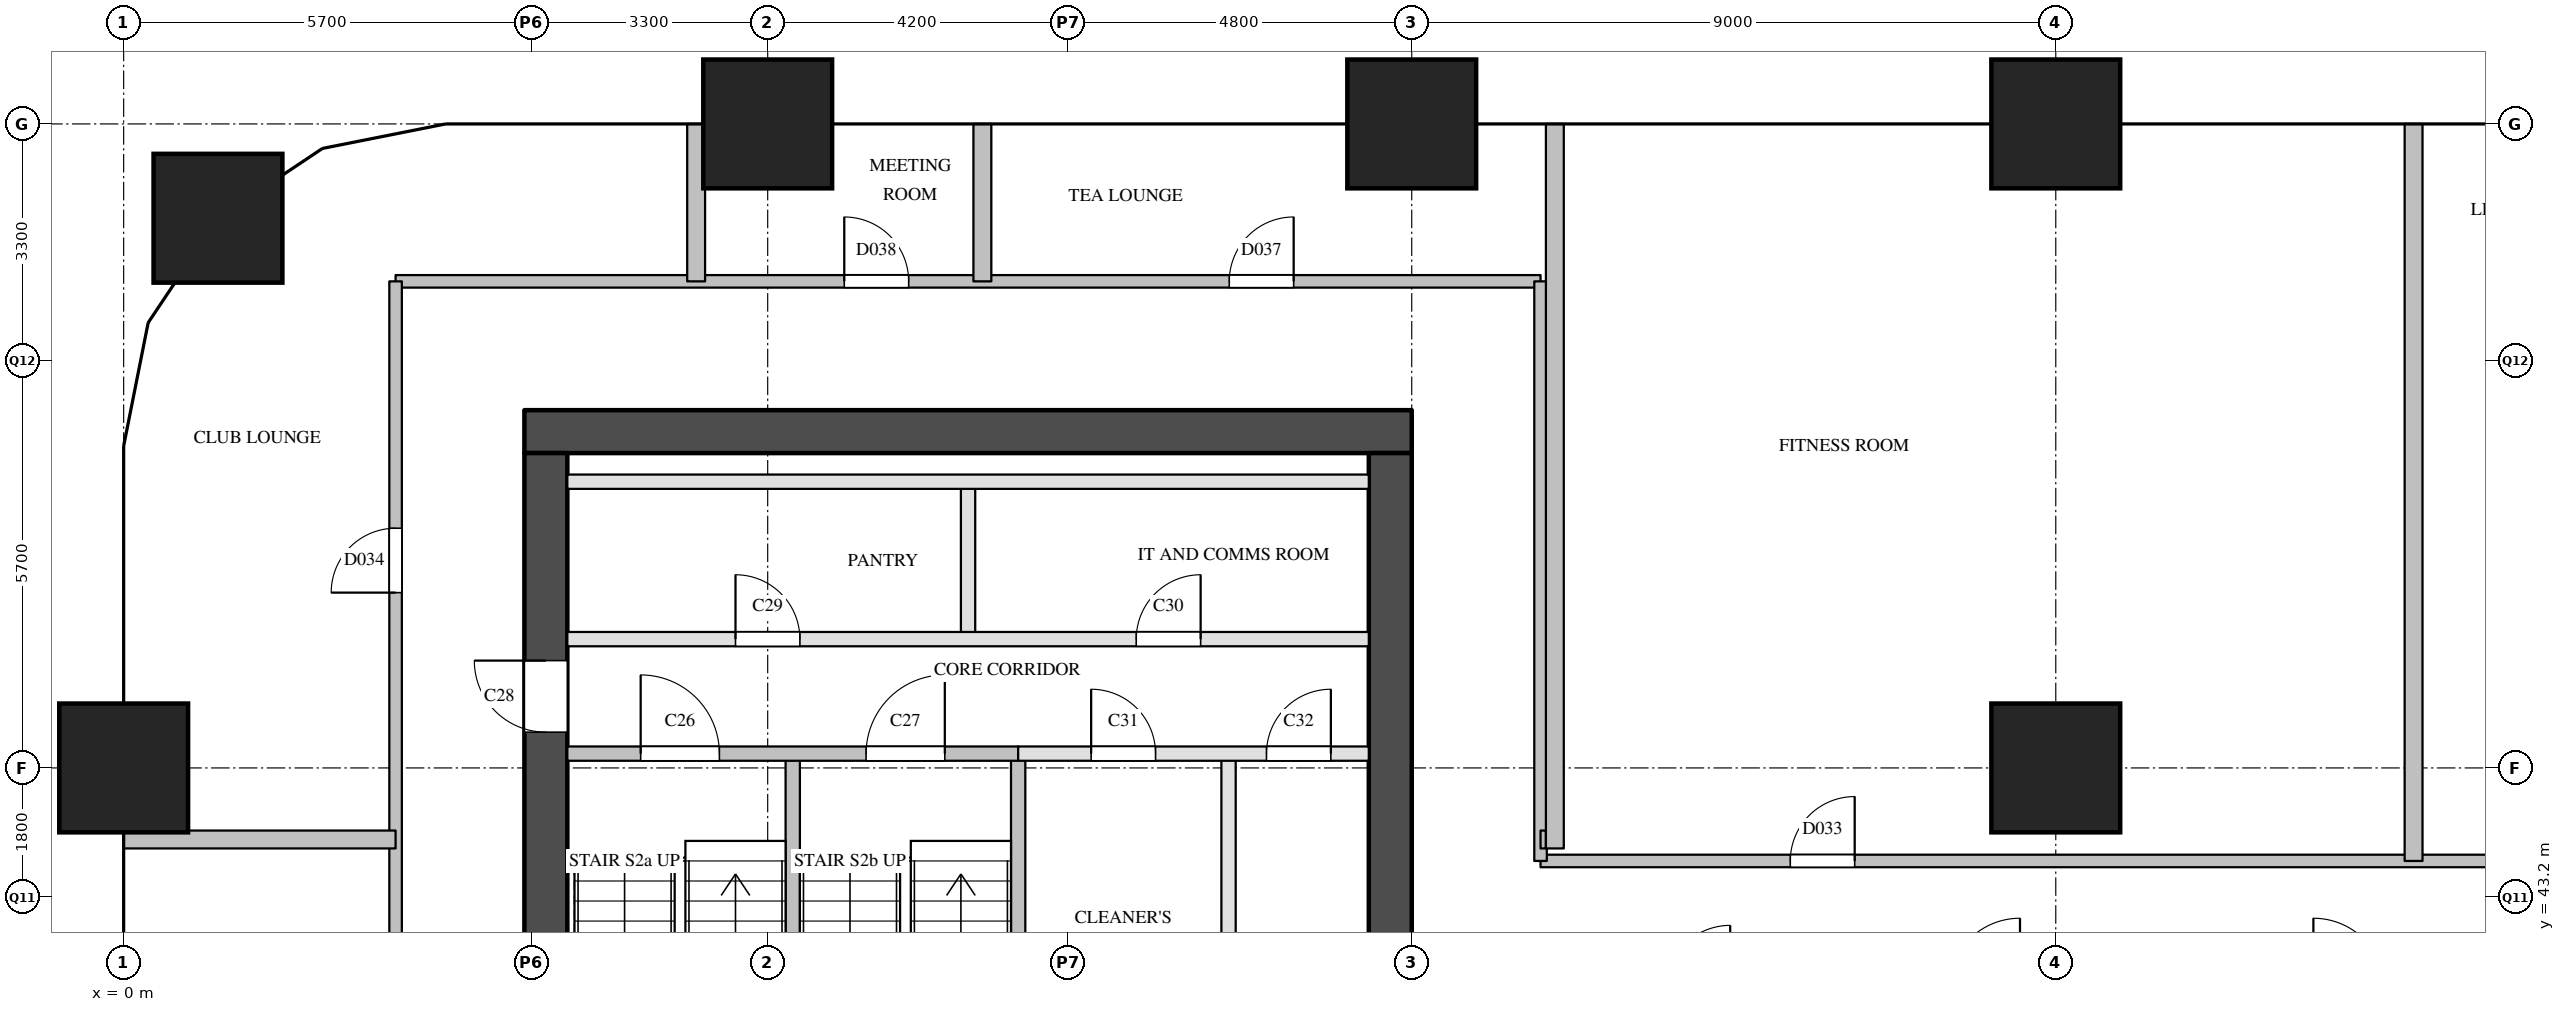
"""IFC4 building model, lengths in metres.
Left out: names, types, materials, properties, quantities, classifications, styles, units other than length and angle.
Written with IfcOpenShell. Run it as: python <this file> out.ifc"""

import sys

from ifc_helpers import new_model, si_unit, direction, frame, frame_2d, origin, origin_2d, place, context, subcontext, project, spatial, rectangle, extrude, element, fill, save


model = new_model("IFC4")
c1 = context("Model", 3, precision=1e-05, world=origin(), true_north=direction((0.0, 1.0)))
c2 = subcontext(c1, "Body", "Model", "MODEL_VIEW")
j1 = project(units=[si_unit("LENGTHUNIT", "METRE"), si_unit("PLANEANGLEUNIT", "RADIAN")], contexts=[c1])
p1 = place(None, origin())
s1 = spatial("IfcSite", under=j1, at=p1, CompositionType="ELEMENT")
p2 = place(p1, origin())
s2 = spatial("IfcBuilding", under=s1, at=p2, CompositionType="ELEMENT")
p3 = place(p2, frame((0.0, 0.0, 81.6)))
s3 = spatial("IfcBuildingStorey", under=s2, at=p3, CompositionType="ELEMENT", Elevation=81.6)
for number, where, z_axis, x_axis in (
    (1, (0.0, 45.0, 0.0), (0.0, 0.0, 1.0), (1.0, 0.0, 0.0)),
    (2, (1.318, 52.682, 0.0), (0.0, 0.0, 1.0), (1.0, 0.0, 0.0)),
    (3, (9.0, 54.0, 0.0), (0.0, 0.0, 1.0), (1.0, 0.0, 0.0)),
    (4, (18.0, 54.0, 0.0), (0.0, 0.0, 1.0), (1.0, 0.0, 0.0)),
    (5, (27.0, 45.0, 0.0), (0.0, 0.0, 1.0), (1.0, 0.0, 0.0)),
    (6, (27.0, 54.0, 0.0), (0.0, 0.0, 1.0), (1.0, 0.0, 0.0)),
):
    element("IfcColumn", number, at=place(p3, frame(where, z_axis=z_axis, x_axis=x_axis)), inside=s3, PredefinedType="COLUMN", context=c2, shape_type="SweptSolid", body=[
        extrude(rectangle(XDim=1.8, YDim=1.8, at=origin_2d()), origin(), (0.0, 0.0, 1.0), 3.8),
    ])
p4 = place(p3, frame((5.6, 49.7, 0.0), z_axis=(0.0, 0.0, 1.0), x_axis=(1.0, 0.0, 0.0)))
e7 = element("IfcWall", 7, at=p4, inside=s3, PredefinedType="SHEAR", context=c2, shape_type="SweptSolid", body=[
    extrude(rectangle(XDim=12.4, YDim=0.6, at=frame_2d((6.2, 0.0))), origin(), (0.0, 0.0, 1.0), 3.5),
])
p5 = place(p3, frame((5.9, 29.1, 0.0), z_axis=(0.0, 0.0, 1.0), x_axis=(0.0, 1.0, 0.0)))
e8 = element("IfcWall", 8, at=p5, inside=s3, PredefinedType="SHEAR", context=c2, shape_type="SweptSolid", body=[
    extrude(rectangle(XDim=20.3, YDim=0.6, at=frame_2d((10.15, 0.0))), origin(), (0.0, 0.0, 1.0), 3.5),
])
p6 = place(p5, frame((3.6, 0.0, 0.0)))
e9 = element("IfcOpeningElement", 9, at=p6, cuts=e8, PredefinedType="OPENING", context=c2, shape_type="SweptSolid", body=[
    extrude(rectangle(XDim=1.8, YDim=2.1, at=frame_2d((0.9, 1.05))), frame((0.0, 0.31, 0.0), z_axis=(0.0, -1.0, 0.0), x_axis=(1.0, 0.0, 0.0)), (0.0, 0.0, 1.0), 0.62),
])
p7 = place(p5, frame((16.4, 0.0, 0.0)))
e10 = element("IfcOpeningElement", 10, at=p7, cuts=e8, PredefinedType="OPENING", context=c2, shape_type="SweptSolid", body=[
    extrude(rectangle(XDim=1.0, YDim=2.1, at=frame_2d((0.5, 1.05))), frame((0.0, 0.31, 0.0), z_axis=(0.0, -1.0, 0.0), x_axis=(1.0, 0.0, 0.0)), (0.0, 0.0, 1.0), 0.62),
])
p8 = place(p3, frame((17.7, 29.1, 0.0), z_axis=(0.0, 0.0, 1.0), x_axis=(0.0, 1.0, 0.0)))
e11 = element("IfcWall", 11, at=p8, inside=s3, PredefinedType="SHEAR", context=c2, shape_type="SweptSolid", body=[
    extrude(rectangle(XDim=20.3, YDim=0.6, at=frame_2d((10.15, 0.0))), origin(), (0.0, 0.0, 1.0), 3.5),
])
p9 = place(p8, frame((1.25, 0.0, 0.0)))
e12 = element("IfcOpeningElement", 12, at=p9, cuts=e11, PredefinedType="OPENING", context=c2, shape_type="SweptSolid", body=[
    extrude(rectangle(XDim=0.7, YDim=2.1, at=frame_2d((0.35, 1.05))), frame((0.0, 0.31, 0.0), z_axis=(0.0, -1.0, 0.0), x_axis=(1.0, 0.0, 0.0)), (0.0, 0.0, 1.0), 0.62),
])
p10 = place(p8, frame((7.05, 0.0, 0.0)))
e13 = element("IfcOpeningElement", 13, at=p10, cuts=e11, PredefinedType="OPENING", context=c2, shape_type="SweptSolid", body=[
    extrude(rectangle(XDim=0.7, YDim=2.1, at=frame_2d((0.35, 1.05))), frame((0.0, 0.31, 0.0), z_axis=(0.0, -1.0, 0.0), x_axis=(1.0, 0.0, 0.0)), (0.0, 0.0, 1.0), 0.62),
])
p11 = place(p3, frame((9.35, 40.9, 0.0), z_axis=(0.0, 0.0, 1.0), x_axis=(0.0, 1.0, 0.0)))
e14 = element("IfcWall", 14, at=p11, inside=s3, PredefinedType="SOLIDWALL", context=c2, shape_type="SweptSolid", body=[
    extrude(rectangle(XDim=4.3, YDim=0.2, at=frame_2d((2.15, 0.0))), origin(), (0.0, 0.0, 1.0), 3.5),
])
p12 = place(p3, frame((11.8, 46.8, 0.0), z_axis=(0.0, 0.0, 1.0), x_axis=(0.0, 1.0, 0.0)))
e15 = element("IfcWall", 15, at=p12, inside=s3, PredefinedType="PARTITIONING", context=c2, shape_type="SweptSolid", body=[
    extrude(rectangle(XDim=2.2, YDim=0.2, at=frame_2d((1.1, 0.0))), origin(), (0.0, 0.0, 1.0), 3.5),
])
p13 = place(p3, frame((12.5, 40.9, 0.0), z_axis=(0.0, 0.0, 1.0), x_axis=(0.0, 1.0, 0.0)))
e16 = element("IfcWall", 16, at=p13, inside=s3, PredefinedType="SOLIDWALL", context=c2, shape_type="SweptSolid", body=[
    extrude(rectangle(XDim=4.3, YDim=0.2, at=frame_2d((2.15, 0.0))), origin(), (0.0, 0.0, 1.0), 3.5),
])
p14 = place(p3, frame((15.44, 39.0, 0.0), z_axis=(0.0, 0.0, 1.0), x_axis=(0.0, 1.0, 0.0)))
e17 = element("IfcWall", 17, at=p14, inside=s3, PredefinedType="PARTITIONING", context=c2, shape_type="SweptSolid", body=[
    extrude(rectangle(XDim=6.2, YDim=0.2, at=frame_2d((3.1, 0.0))), origin(), (0.0, 0.0, 1.0), 3.5),
])
p15 = place(p3, frame((12.5, 45.2, 0.0), z_axis=(0.0, 0.0, 1.0), x_axis=(1.0, 0.0, 0.0)))
e18 = element("IfcWall", 18, at=p15, inside=s3, PredefinedType="PARTITIONING", context=c2, shape_type="SweptSolid", body=[
    extrude(rectangle(XDim=4.9, YDim=0.2, at=frame_2d((2.45, 0.0))), origin(), (0.0, 0.0, 1.0), 3.5),
])
p16 = place(p15, frame((1.02, 0.0, 0.0)))
e19 = element("IfcOpeningElement", 19, at=p16, cuts=e18, PredefinedType="OPENING", context=c2, shape_type="SweptSolid", body=[
    extrude(rectangle(XDim=0.9, YDim=2.1, at=frame_2d((0.45, 1.05))), frame((0.0, 0.11, 0.0), z_axis=(0.0, -1.0, 0.0), x_axis=(1.0, 0.0, 0.0)), (0.0, 0.0, 1.0), 0.22),
])
p17 = place(p15, frame((3.47, 0.0, 0.0)))
e20 = element("IfcOpeningElement", 20, at=p17, cuts=e18, PredefinedType="OPENING", context=c2, shape_type="SweptSolid", body=[
    extrude(rectangle(XDim=0.9, YDim=2.1, at=frame_2d((0.45, 1.05))), frame((0.0, 0.11, 0.0), z_axis=(0.0, -1.0, 0.0), x_axis=(1.0, 0.0, 0.0)), (0.0, 0.0, 1.0), 0.22),
])
p18 = place(p3, frame((6.2, 45.2, 0.0), z_axis=(0.0, 0.0, 1.0), x_axis=(1.0, 0.0, 0.0)))
e21 = element("IfcWall", 21, at=p18, inside=s3, PredefinedType="SOLIDWALL", context=c2, shape_type="SweptSolid", body=[
    extrude(rectangle(XDim=6.3, YDim=0.2, at=frame_2d((3.15, 0.0))), origin(), (0.0, 0.0, 1.0), 3.5),
])
p19 = place(p18, frame((1.025, 0.0, 0.0)))
e22 = element("IfcOpeningElement", 22, at=p19, cuts=e21, PredefinedType="OPENING", context=c2, shape_type="SweptSolid", body=[
    extrude(rectangle(XDim=1.1, YDim=2.1, at=frame_2d((0.55, 1.05))), frame((0.0, 0.11, 0.0), z_axis=(0.0, -1.0, 0.0), x_axis=(1.0, 0.0, 0.0)), (0.0, 0.0, 1.0), 0.22),
])
p20 = place(p18, frame((4.175, 0.0, 0.0)))
e23 = element("IfcOpeningElement", 23, at=p20, cuts=e21, PredefinedType="OPENING", context=c2, shape_type="SweptSolid", body=[
    extrude(rectangle(XDim=1.1, YDim=2.1, at=frame_2d((0.55, 1.05))), frame((0.0, 0.11, 0.0), z_axis=(0.0, -1.0, 0.0), x_axis=(1.0, 0.0, 0.0)), (0.0, 0.0, 1.0), 0.22),
])
p21 = place(p3, frame((6.2, 46.8, 0.0), z_axis=(0.0, 0.0, 1.0), x_axis=(1.0, 0.0, 0.0)))
e24 = element("IfcWall", 24, at=p21, inside=s3, PredefinedType="PARTITIONING", context=c2, shape_type="SweptSolid", body=[
    extrude(rectangle(XDim=11.2, YDim=0.2, at=frame_2d((5.6, 0.0))), origin(), (0.0, 0.0, 1.0), 3.5),
])
p22 = place(p21, frame((2.35, 0.0, 0.0)))
e25 = element("IfcOpeningElement", 25, at=p22, cuts=e24, PredefinedType="OPENING", context=c2, shape_type="SweptSolid", body=[
    extrude(rectangle(XDim=0.9, YDim=2.1, at=frame_2d((0.45, 1.05))), frame((0.0, 0.11, 0.0), z_axis=(0.0, -1.0, 0.0), x_axis=(1.0, 0.0, 0.0)), (0.0, 0.0, 1.0), 0.22),
])
p23 = place(p21, frame((7.95, 0.0, 0.0)))
e26 = element("IfcOpeningElement", 26, at=p23, cuts=e24, PredefinedType="OPENING", context=c2, shape_type="SweptSolid", body=[
    extrude(rectangle(XDim=0.9, YDim=2.1, at=frame_2d((0.45, 1.05))), frame((0.0, 0.11, 0.0), z_axis=(0.0, -1.0, 0.0), x_axis=(1.0, 0.0, 0.0)), (0.0, 0.0, 1.0), 0.22),
])
p24 = place(p3, frame((6.2, 49.0, 0.0), z_axis=(0.0, 0.0, 1.0), x_axis=(1.0, 0.0, 0.0)))
e27 = element("IfcWall", 27, at=p24, inside=s3, PredefinedType="PARTITIONING", context=c2, shape_type="SweptSolid", body=[
    extrude(rectangle(XDim=11.2, YDim=0.2, at=frame_2d((5.6, 0.0))), origin(), (0.0, 0.0, 1.0), 3.5),
])
p25 = place(p3, frame((19.8, 43.7, 0.0), z_axis=(0.0, 0.0, 1.0), x_axis=(1.0, 0.0, 0.0)))
e28 = element("IfcWall", 28, at=p25, inside=s3, PredefinedType="PARTITIONING", context=c2, shape_type="SweptSolid", body=[
    extrude(rectangle(XDim=14.4, YDim=0.175, at=frame_2d((7.2, 0.0))), origin(), (0.0, 0.0, 1.0), 2.5),
])
p26 = place(p25, frame((3.49, 0.0, 0.0)))
e29 = element("IfcOpeningElement", 29, at=p26, cuts=e28, PredefinedType="OPENING", context=c2, shape_type="SweptSolid", body=[
    extrude(rectangle(XDim=0.9, YDim=2.1, at=frame_2d((0.45, 1.05))), frame((0.0, 0.097, 0.0), z_axis=(0.0, -1.0, 0.0), x_axis=(1.0, 0.0, 0.0)), (0.0, 0.0, 1.0), 0.195),
])
p27 = place(p3, frame((3.8, 51.8, 0.0), z_axis=(0.0, 0.0, 1.0), x_axis=(1.0, 0.0, 0.0)))
e30 = element("IfcWall", 30, at=p27, inside=s3, PredefinedType="PARTITIONING", context=c2, shape_type="SweptSolid", body=[
    extrude(rectangle(XDim=16.0, YDim=0.175, at=frame_2d((8.0, 0.0))), origin(), (0.0, 0.0, 1.0), 3.5),
])
p28 = place(p27, frame((11.65, 0.0, 0.0)))
e31 = element("IfcOpeningElement", 31, at=p28, cuts=e30, PredefinedType="OPENING", context=c2, shape_type="SweptSolid", body=[
    extrude(rectangle(XDim=0.9, YDim=2.1, at=frame_2d((0.45, 1.05))), frame((0.0, 0.097, 0.0), z_axis=(0.0, -1.0, 0.0), x_axis=(1.0, 0.0, 0.0)), (0.0, 0.0, 1.0), 0.195),
])
p29 = place(p27, frame((6.27, 0.0, 0.0)))
e32 = element("IfcOpeningElement", 32, at=p29, cuts=e30, PredefinedType="OPENING", context=c2, shape_type="SweptSolid", body=[
    extrude(rectangle(XDim=0.9, YDim=2.1, at=frame_2d((0.45, 1.05))), frame((0.0, 0.097, 0.0), z_axis=(0.0, -1.0, 0.0), x_axis=(1.0, 0.0, 0.0)), (0.0, 0.0, 1.0), 0.195),
])
p30 = place(p3, frame((3.8, 28.5, 0.0), z_axis=(0.0, 0.0, 1.0), x_axis=(0.0, 1.0, 0.0)))
e33 = element("IfcWall", 33, at=p30, inside=s3, PredefinedType="PARTITIONING", context=c2, shape_type="SweptSolid", body=[
    extrude(rectangle(XDim=23.3, YDim=0.175, at=frame_2d((11.65, 0.0))), origin(), (0.0, 0.0, 1.0), 3.5),
])
p31 = place(p30, frame((3.3, 0.0, 0.0)))
e34 = element("IfcOpeningElement", 34, at=p31, cuts=e33, PredefinedType="OPENING", context=c2, shape_type="SweptSolid", body=[
    extrude(rectangle(XDim=0.9, YDim=2.1, at=frame_2d((0.45, 1.05))), frame((0.0, 0.097, 0.0), z_axis=(0.0, -1.0, 0.0), x_axis=(1.0, 0.0, 0.0)), (0.0, 0.0, 1.0), 0.195),
])
p32 = place(p30, frame((11.05, 0.0, 0.0)))
e35 = element("IfcOpeningElement", 35, at=p32, cuts=e33, PredefinedType="OPENING", context=c2, shape_type="SweptSolid", body=[
    extrude(rectangle(XDim=0.9, YDim=2.1, at=frame_2d((0.45, 1.05))), frame((0.0, 0.097, 0.0), z_axis=(0.0, -1.0, 0.0), x_axis=(1.0, 0.0, 0.0)), (0.0, 0.0, 1.0), 0.195),
])
p33 = place(p30, frame((18.95, 0.0, 0.0)))
e36 = element("IfcOpeningElement", 36, at=p33, cuts=e33, PredefinedType="OPENING", context=c2, shape_type="SweptSolid", body=[
    extrude(rectangle(XDim=0.9, YDim=2.1, at=frame_2d((0.45, 1.05))), frame((0.0, 0.097, 0.0), z_axis=(0.0, -1.0, 0.0), x_axis=(1.0, 0.0, 0.0)), (0.0, 0.0, 1.0), 0.195),
])
p34 = place(p3, frame((19.8, 43.7, 0.0), z_axis=(0.0, 0.0, 1.0), x_axis=(0.0, 1.0, 0.0)))
e37 = element("IfcWall", 37, at=p34, inside=s3, PredefinedType="PARTITIONING", context=c2, shape_type="SweptSolid", body=[
    extrude(rectangle(XDim=8.1, YDim=0.175, at=frame_2d((4.05, 0.0))), origin(), (0.0, 0.0, 1.0), 3.5),
])
p35 = place(p3, frame((0.0, 44.0, 0.0), z_axis=(0.0, 0.0, 1.0), x_axis=(1.0, 0.0, 0.0)))
e38 = element("IfcWall", 38, at=p35, inside=s3, PredefinedType="PARTITIONING", context=c2, shape_type="SweptSolid", body=[
    extrude(rectangle(XDim=3.8, YDim=0.25, at=frame_2d((1.9, 0.0))), origin(), (0.0, 0.0, 1.0), 2.5),
])
p36 = place(p3, frame((19.8, 44.0, 0.0), z_axis=(0.0, 0.0, 1.0), x_axis=(1.0, 0.0, 0.0)))
e39 = element("IfcWall", 39, at=p36, inside=s3, PredefinedType="PARTITIONING", context=c2, shape_type="SweptSolid", body=[
    extrude(rectangle(XDim=0.075, YDim=0.25, at=frame_2d((0.038, 0.0))), origin(), (0.0, 0.0, 1.0), 3.5),
])
for number, where, z_axis, x_axis in (
    (40, (8.0, 51.8, 0.0), (0.0, 0.0, 1.0), (0.0, 1.0, 0.0)),
    (41, (12.0, 51.8, 0.0), (0.0, 0.0, 1.0), (0.0, 1.0, 0.0)),
):
    element("IfcWall", number, at=place(p3, frame(where, z_axis=z_axis, x_axis=x_axis)), inside=s3, PredefinedType="PARTITIONING", context=c2, shape_type="SweptSolid", body=[
        extrude(rectangle(XDim=2.2, YDim=0.25, at=frame_2d((1.1, 0.0))), origin(), (0.0, 0.0, 1.0), 2.5),
    ])
p37 = place(p3, frame((20.0, 43.875, 0.0), z_axis=(0.0, 0.0, 1.0), x_axis=(0.0, 1.0, 0.0)))
e42 = element("IfcWall", 42, at=p37, inside=s3, PredefinedType="PARTITIONING", context=c2, shape_type="SweptSolid", body=[
    extrude(rectangle(XDim=10.125, YDim=0.25, at=frame_2d((5.062, 0.0))), origin(), (0.0, 0.0, 1.0), 2.5),
])
p38 = place(p3, frame((32.0, 43.7, 0.0), z_axis=(0.0, 0.0, 1.0), x_axis=(0.0, 1.0, 0.0)))
e43 = element("IfcWall", 43, at=p38, inside=s3, PredefinedType="PARTITIONING", context=c2, shape_type="SweptSolid", body=[
    extrude(rectangle(XDim=10.3, YDim=0.25, at=frame_2d((5.15, 0.0))), origin(), (0.0, 0.0, 1.0), 2.5),
])
p39 = place(p19, origin())
e44 = element("IfcDoor", 44, at=p39, inside=s3, OperationType="SINGLE_SWING_LEFT", PredefinedType="DOOR", context=c2, shape_type="SweptSolid", body=[
    extrude(rectangle(XDim=1.1, YDim=2.1, at=frame_2d((0.55, 1.05))), frame((0.0, 0.025, 0.0), z_axis=(0.0, -1.0, 0.0), x_axis=(1.0, 0.0, 0.0)), (0.0, 0.0, 1.0), 0.05),
])
fill(e22, e44)
p40 = place(p20, origin())
e45 = element("IfcDoor", 45, at=p40, inside=s3, OperationType="SINGLE_SWING_RIGHT", PredefinedType="DOOR", context=c2, shape_type="SweptSolid", body=[
    extrude(rectangle(XDim=1.1, YDim=2.1, at=frame_2d((0.55, 1.05))), frame((0.0, 0.025, 0.0), z_axis=(0.0, -1.0, 0.0), x_axis=(1.0, 0.0, 0.0)), (0.0, 0.0, 1.0), 0.05),
])
fill(e23, e45)
p41 = place(p7, origin())
e46 = element("IfcDoor", 46, at=p41, inside=s3, OperationType="SINGLE_SWING_RIGHT", PredefinedType="DOOR", context=c2, shape_type="SweptSolid", body=[
    extrude(rectangle(XDim=1.0, YDim=2.1, at=frame_2d((0.5, 1.05))), frame((0.0, 0.025, 0.0), z_axis=(0.0, -1.0, 0.0), x_axis=(1.0, 0.0, 0.0)), (0.0, 0.0, 1.0), 0.05),
])
fill(e10, e46)
p42 = place(p22, origin())
e47 = element("IfcDoor", 47, at=p42, inside=s3, OperationType="SINGLE_SWING_LEFT", PredefinedType="DOOR", context=c2, shape_type="SweptSolid", body=[
    extrude(rectangle(XDim=0.9, YDim=2.1, at=frame_2d((0.45, 1.05))), frame((0.0, 0.025, 0.0), z_axis=(0.0, -1.0, 0.0), x_axis=(1.0, 0.0, 0.0)), (0.0, 0.0, 1.0), 0.05),
])
fill(e25, e47)
p43 = place(p23, origin())
e48 = element("IfcDoor", 48, at=p43, inside=s3, OperationType="SINGLE_SWING_RIGHT", PredefinedType="DOOR", context=c2, shape_type="SweptSolid", body=[
    extrude(rectangle(XDim=0.9, YDim=2.1, at=frame_2d((0.45, 1.05))), frame((0.0, 0.025, 0.0), z_axis=(0.0, -1.0, 0.0), x_axis=(1.0, 0.0, 0.0)), (0.0, 0.0, 1.0), 0.05),
])
fill(e26, e48)
p44 = place(p16, origin())
e49 = element("IfcDoor", 49, at=p44, inside=s3, OperationType="SINGLE_SWING_LEFT", PredefinedType="DOOR", context=c2, shape_type="SweptSolid", body=[
    extrude(rectangle(XDim=0.9, YDim=2.1, at=frame_2d((0.45, 1.05))), frame((0.0, 0.025, 0.0), z_axis=(0.0, -1.0, 0.0), x_axis=(1.0, 0.0, 0.0)), (0.0, 0.0, 1.0), 0.05),
])
fill(e19, e49)
p45 = place(p17, origin())
e50 = element("IfcDoor", 50, at=p45, inside=s3, OperationType="SINGLE_SWING_RIGHT", PredefinedType="DOOR", context=c2, shape_type="SweptSolid", body=[
    extrude(rectangle(XDim=0.9, YDim=2.1, at=frame_2d((0.45, 1.05))), frame((0.0, 0.025, 0.0), z_axis=(0.0, -1.0, 0.0), x_axis=(1.0, 0.0, 0.0)), (0.0, 0.0, 1.0), 0.05),
])
fill(e20, e50)
p46 = place(p26, origin())
e51 = element("IfcDoor", 51, at=p46, inside=s3, OperationType="SINGLE_SWING_RIGHT", PredefinedType="DOOR", context=c2, shape_type="SweptSolid", body=[
    extrude(rectangle(XDim=0.9, YDim=2.1, at=frame_2d((0.45, 1.05))), frame((0.0, 0.025, 0.0), z_axis=(0.0, -1.0, 0.0), x_axis=(1.0, 0.0, 0.0)), (0.0, 0.0, 1.0), 0.05),
])
fill(e29, e51)
p47 = place(p33, origin())
e52 = element("IfcDoor", 52, at=p47, inside=s3, OperationType="SINGLE_SWING_LEFT", PredefinedType="DOOR", context=c2, shape_type="SweptSolid", body=[
    extrude(rectangle(XDim=0.9, YDim=2.1, at=frame_2d((0.45, 1.05))), frame((0.0, 0.025, 0.0), z_axis=(0.0, -1.0, 0.0), x_axis=(1.0, 0.0, 0.0)), (0.0, 0.0, 1.0), 0.05),
])
fill(e36, e52)
p48 = place(p28, origin())
e53 = element("IfcDoor", 53, at=p48, inside=s3, OperationType="SINGLE_SWING_RIGHT", PredefinedType="DOOR", context=c2, shape_type="SweptSolid", body=[
    extrude(rectangle(XDim=0.9, YDim=2.1, at=frame_2d((0.45, 1.05))), frame((0.0, 0.025, 0.0), z_axis=(0.0, -1.0, 0.0), x_axis=(1.0, 0.0, 0.0)), (0.0, 0.0, 1.0), 0.05),
])
fill(e31, e53)
p49 = place(p29, origin())
e54 = element("IfcDoor", 54, at=p49, inside=s3, OperationType="SINGLE_SWING_LEFT", PredefinedType="DOOR", context=c2, shape_type="SweptSolid", body=[
    extrude(rectangle(XDim=0.9, YDim=2.1, at=frame_2d((0.45, 1.05))), frame((0.0, 0.025, 0.0), z_axis=(0.0, -1.0, 0.0), x_axis=(1.0, 0.0, 0.0)), (0.0, 0.0, 1.0), 0.05),
])
fill(e32, e54)
save(model, sys.argv[1])
